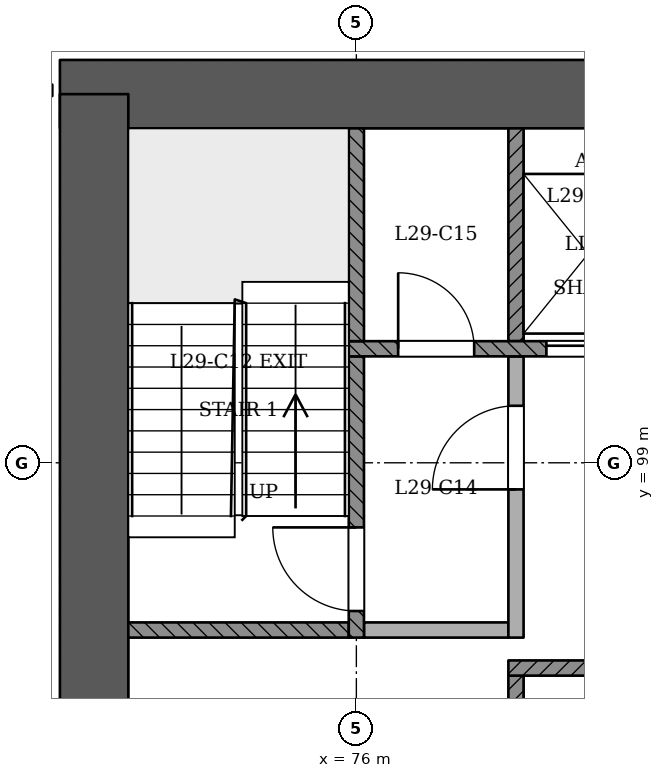
"""IFC4 building model, lengths in metres.
Left out: names, types, materials, properties, quantities, classifications, styles, units other than length and angle.
Written with IfcOpenShell. Run it as: python <this file> out.ifc"""

import sys

from ifc_helpers import new_model, si_unit, direction, frame, frame_2d, origin, place, context, subcontext, project, spatial, rectangle, extrude, element, fill, save


model = new_model("IFC4")
c1 = context("Model", 3, precision=1e-05, world=origin(), true_north=direction((0.0, 1.0)))
c2 = subcontext(c1, "Body", "Model", "MODEL_VIEW")
j1 = project(units=[si_unit("LENGTHUNIT", "METRE"), si_unit("PLANEANGLEUNIT", "RADIAN")], contexts=[c1])
p1 = place(None, origin())
s1 = spatial("IfcSite", under=j1, at=p1, CompositionType="ELEMENT")
p2 = place(p1, origin())
s2 = spatial("IfcBuilding", under=s1, at=p2, CompositionType="ELEMENT")
p3 = place(p2, frame((0.0, 0.0, 115.2)))
s3 = spatial("IfcBuildingStorey", under=s2, at=p3, CompositionType="ELEMENT", Elevation=115.2)
p4 = place(p3, frame((97.45, 103.85, 0.0), z_axis=(0.0, 0.0, 1.0), x_axis=(-1.0, 0.0, 0.0)))
e1 = element("IfcWall", 1, at=p4, inside=s3, PredefinedType="SHEAR", context=c2, shape_type="SweptSolid", body=[
    extrude(rectangle(XDim=25.35, YDim=0.9, at=frame_2d((12.675, 0.0))), origin(), (0.0, 0.0, 1.0), 3.6),
])
p5 = place(p3, frame((72.55, 103.85, 0.0), z_axis=(0.0, 0.0, 1.0), x_axis=(0.0, -1.0, 0.0)))
e2 = element("IfcWall", 2, at=p5, inside=s3, PredefinedType="SHEAR", context=c2, shape_type="SweptSolid", body=[
    extrude(rectangle(XDim=11.35, YDim=0.9, at=frame_2d((5.675, 0.0))), origin(), (0.0, 0.0, 1.0), 3.6),
])
p6 = place(p3, frame((64.109, 97.973, 0.0), z_axis=(0.0, 0.0, 1.0), x_axis=(0.499997402089, -0.866026903684, 0.0)))
e3 = element("IfcWall", 3, at=p6, inside=s3, PredefinedType="PARTITIONING", context=c2, shape_type="SweptSolid", body=[
    extrude(rectangle(XDim=41.173, YDim=0.15, at=frame_2d((20.586, 0.0))), origin(), (0.0, 0.0, 1.0), 2.75),
])
p7 = place(p6, frame((0.273, 0.0, 0.0)))
e4 = element("IfcOpeningElement", 4, at=p7, cuts=e3, PredefinedType="OPENING", context=c2, shape_type="SweptSolid", body=[
    extrude(rectangle(XDim=1.2, YDim=2.1, at=frame_2d((0.6, 1.05))), frame((0.0, 0.085, 0.0), z_axis=(0.0, -1.0, 0.0), x_axis=(1.0, 0.0, 0.0)), (0.0, 0.0, 1.0), 0.171),
])
p8 = place(p6, frame((10.987, 0.0, 0.0)))
e5 = element("IfcOpeningElement", 5, at=p8, cuts=e3, PredefinedType="OPENING", context=c2, shape_type="SweptSolid", body=[
    extrude(rectangle(XDim=1.2, YDim=2.1, at=frame_2d((0.6, 1.05))), frame((0.0, 0.085, 0.0), z_axis=(0.0, -1.0, 0.0), x_axis=(1.0, 0.0, 0.0)), (0.0, 0.0, 1.0), 0.171),
])
p9 = place(p6, frame((22.237, 0.0, 0.0)))
e6 = element("IfcOpeningElement", 6, at=p9, cuts=e3, PredefinedType="OPENING", context=c2, shape_type="SweptSolid", body=[
    extrude(rectangle(XDim=1.2, YDim=2.1, at=frame_2d((0.6, 1.05))), frame((0.0, 0.085, 0.0), z_axis=(0.0, -1.0, 0.0), x_axis=(1.0, 0.0, 0.0)), (0.0, 0.0, 1.0), 0.171),
])
p10 = place(p6, frame((32.387, 0.0, 0.0)))
e7 = element("IfcOpeningElement", 7, at=p10, cuts=e3, PredefinedType="OPENING", context=c2, shape_type="SweptSolid", body=[
    extrude(rectangle(XDim=1.2, YDim=2.1, at=frame_2d((0.6, 1.05))), frame((0.0, 0.085, 0.0), z_axis=(0.0, -1.0, 0.0), x_axis=(1.0, 0.0, 0.0)), (0.0, 0.0, 1.0), 0.171),
])
p11 = place(p6, frame((39.95, 0.0, 0.0)))
e8 = element("IfcOpeningElement", 8, at=p11, cuts=e3, PredefinedType="OPENING", context=c2, shape_type="SweptSolid", body=[
    extrude(rectangle(XDim=1.0, YDim=2.1, at=frame_2d((0.5, 1.05))), frame((0.0, 0.085, 0.0), z_axis=(0.0, -1.0, 0.0), x_axis=(1.0, 0.0, 0.0)), (0.0, 0.0, 1.0), 0.171),
])
p12 = place(p3, frame((78.1, 93.4, 0.0), z_axis=(0.0, 0.0, 1.0), x_axis=(0.0, 1.0, 0.0)))
e9 = element("IfcWall", 9, at=p12, inside=s3, PredefinedType="SOLIDWALL", context=c2, shape_type="SweptSolid", body=[
    extrude(rectangle(XDim=2.8, YDim=0.2, at=frame_2d((1.4, 0.0))), origin(), (0.0, 0.0, 1.0), 3.15),
])
p13 = place(p3, frame((78.0, 96.3, 0.0), z_axis=(0.0, 0.0, 1.0), x_axis=(1.0, 0.0, 0.0)))
e10 = element("IfcWall", 10, at=p13, inside=s3, PredefinedType="SOLIDWALL", context=c2, shape_type="SweptSolid", body=[
    extrude(rectangle(XDim=7.8, YDim=0.2, at=frame_2d((3.9, 0.0))), origin(), (0.0, 0.0, 1.0), 3.15),
])
p14 = place(p3, frame((73.0, 96.8, 0.0), z_axis=(0.0, 0.0, 1.0), x_axis=(1.0, 0.0, 0.0)))
e11 = element("IfcWall", 11, at=p14, inside=s3, PredefinedType="SOLIDWALL", context=c2, shape_type="SweptSolid", body=[
    extrude(rectangle(XDim=2.9, YDim=0.2, at=frame_2d((1.45, 0.0))), origin(), (0.0, 0.0, 1.0), 3.15),
])
p15 = place(p3, frame((76.0, 96.7, 0.0), z_axis=(0.0, 0.0, 1.0), x_axis=(0.0, 1.0, 0.0)))
e12 = element("IfcWall", 12, at=p15, inside=s3, PredefinedType="SOLIDWALL", context=c2, shape_type="SweptSolid", body=[
    extrude(rectangle(XDim=3.7, YDim=0.2, at=frame_2d((1.85, 0.0))), origin(), (0.0, 0.0, 1.0), 3.15),
])
p16 = place(p15, frame((0.35, 0.0, 0.0)))
e13 = element("IfcOpeningElement", 13, at=p16, cuts=e12, PredefinedType="OPENING", context=c2, shape_type="SweptSolid", body=[
    extrude(rectangle(XDim=1.1, YDim=2.1, at=frame_2d((0.55, 1.05))), frame((0.0, 0.11, 0.0), z_axis=(0.0, -1.0, 0.0), x_axis=(1.0, 0.0, 0.0)), (0.0, 0.0, 1.0), 0.221),
])
p17 = place(p3, frame((76.1, 96.8, 0.0), z_axis=(0.0, 0.0, 1.0), x_axis=(1.0, 0.0, 0.0)))
e14 = element("IfcWall", 14, at=p17, inside=s3, PredefinedType="PARTITIONING", context=c2, shape_type="SweptSolid", body=[
    extrude(rectangle(XDim=1.9, YDim=0.2, at=frame_2d((0.95, 0.0))), origin(), (0.0, 0.0, 1.0), 3.15),
])
p18 = place(p3, frame((78.1, 96.7, 0.0), z_axis=(0.0, 0.0, 1.0), x_axis=(0.0, 1.0, 0.0)))
e15 = element("IfcWall", 15, at=p18, inside=s3, PredefinedType="PARTITIONING", context=c2, shape_type="SweptSolid", body=[
    extrude(rectangle(XDim=3.7, YDim=0.2, at=frame_2d((1.85, 0.0))), origin(), (0.0, 0.0, 1.0), 3.15),
])
p19 = place(p18, frame((1.95, 0.0, 0.0)))
e16 = element("IfcOpeningElement", 16, at=p19, cuts=e15, PredefinedType="OPENING", context=c2, shape_type="SweptSolid", body=[
    extrude(rectangle(XDim=1.1, YDim=2.1, at=frame_2d((0.55, 1.05))), frame((0.0, 0.11, 0.0), z_axis=(0.0, -1.0, 0.0), x_axis=(1.0, 0.0, 0.0)), (0.0, 0.0, 1.0), 0.221),
])
p20 = place(p3, frame((75.9, 100.5, 0.0), z_axis=(0.0, 0.0, 1.0), x_axis=(1.0, 0.0, 0.0)))
e17 = element("IfcWall", 17, at=p20, inside=s3, PredefinedType="SOLIDWALL", context=c2, shape_type="SweptSolid", body=[
    extrude(rectangle(XDim=18.2, YDim=0.2, at=frame_2d((9.1, 0.0))), origin(), (0.0, 0.0, 1.0), 3.15),
])
p21 = place(p20, frame((2.6, 0.0, 0.0)))
e18 = element("IfcOpeningElement", 18, at=p21, cuts=e17, PredefinedType="OPENING", context=c2, shape_type="SweptSolid", body=[
    extrude(rectangle(XDim=1.1, YDim=2.1, at=frame_2d((0.55, 1.05))), frame((0.0, 0.11, 0.0), z_axis=(0.0, -1.0, 0.0), x_axis=(1.0, 0.0, 0.0)), (0.0, 0.0, 1.0), 0.221),
])
p22 = place(p20, frame((4.5, 0.0, 0.0)))
e19 = element("IfcOpeningElement", 19, at=p22, cuts=e17, PredefinedType="OPENING", context=c2, shape_type="SweptSolid", body=[
    extrude(rectangle(XDim=1.1, YDim=2.1, at=frame_2d((0.55, 1.05))), frame((0.0, 0.11, 0.0), z_axis=(0.0, -1.0, 0.0), x_axis=(1.0, 0.0, 0.0)), (0.0, 0.0, 1.0), 0.221),
])
p23 = place(p20, frame((6.4, 0.0, 0.0)))
e20 = element("IfcOpeningElement", 20, at=p23, cuts=e17, PredefinedType="OPENING", context=c2, shape_type="SweptSolid", body=[
    extrude(rectangle(XDim=1.1, YDim=2.1, at=frame_2d((0.55, 1.05))), frame((0.0, 0.11, 0.0), z_axis=(0.0, -1.0, 0.0), x_axis=(1.0, 0.0, 0.0)), (0.0, 0.0, 1.0), 0.221),
])
p24 = place(p20, frame((8.3, 0.0, 0.0)))
e21 = element("IfcOpeningElement", 21, at=p24, cuts=e17, PredefinedType="OPENING", context=c2, shape_type="SweptSolid", body=[
    extrude(rectangle(XDim=1.1, YDim=2.1, at=frame_2d((0.55, 1.05))), frame((0.0, 0.11, 0.0), z_axis=(0.0, -1.0, 0.0), x_axis=(1.0, 0.0, 0.0)), (0.0, 0.0, 1.0), 0.221),
])
p25 = place(p20, frame((10.2, 0.0, 0.0)))
e22 = element("IfcOpeningElement", 22, at=p25, cuts=e17, PredefinedType="OPENING", context=c2, shape_type="SweptSolid", body=[
    extrude(rectangle(XDim=1.1, YDim=2.1, at=frame_2d((0.55, 1.05))), frame((0.0, 0.11, 0.0), z_axis=(0.0, -1.0, 0.0), x_axis=(1.0, 0.0, 0.0)), (0.0, 0.0, 1.0), 0.221),
])
p26 = place(p20, frame((12.1, 0.0, 0.0)))
e23 = element("IfcOpeningElement", 23, at=p26, cuts=e17, PredefinedType="OPENING", context=c2, shape_type="SweptSolid", body=[
    extrude(rectangle(XDim=1.1, YDim=2.1, at=frame_2d((0.55, 1.05))), frame((0.0, 0.11, 0.0), z_axis=(0.0, -1.0, 0.0), x_axis=(1.0, 0.0, 0.0)), (0.0, 0.0, 1.0), 0.221),
])
p27 = place(p20, frame((14.0, 0.0, 0.0)))
e24 = element("IfcOpeningElement", 24, at=p27, cuts=e17, PredefinedType="OPENING", context=c2, shape_type="SweptSolid", body=[
    extrude(rectangle(XDim=1.1, YDim=2.1, at=frame_2d((0.55, 1.05))), frame((0.0, 0.11, 0.0), z_axis=(0.0, -1.0, 0.0), x_axis=(1.0, 0.0, 0.0)), (0.0, 0.0, 1.0), 0.221),
])
p28 = place(p20, frame((0.65, 0.0, 0.0)))
e25 = element("IfcOpeningElement", 25, at=p28, cuts=e17, PredefinedType="OPENING", context=c2, shape_type="SweptSolid", body=[
    extrude(rectangle(XDim=1.0, YDim=2.1, at=frame_2d((0.5, 1.05))), frame((0.0, 0.11, 0.0), z_axis=(0.0, -1.0, 0.0), x_axis=(1.0, 0.0, 0.0)), (0.0, 0.0, 1.0), 0.221),
])
p29 = place(p20, frame((16.3, 0.0, 0.0)))
e26 = element("IfcOpeningElement", 26, at=p29, cuts=e17, PredefinedType="OPENING", context=c2, shape_type="SweptSolid", body=[
    extrude(rectangle(XDim=1.0, YDim=2.1, at=frame_2d((0.5, 1.05))), frame((0.0, 0.11, 0.0), z_axis=(0.0, -1.0, 0.0), x_axis=(1.0, 0.0, 0.0)), (0.0, 0.0, 1.0), 0.221),
])
for number, where, z_axis, x_axis in (
    (27, (76.0, 100.6, 0.0), (0.0, 0.0, 1.0), (0.0, 1.0, 0.0)),
    (28, (78.1, 100.6, 0.0), (0.0, 0.0, 1.0), (0.0, 1.0, 0.0)),
):
    element("IfcWall", number, at=place(p3, frame(where, z_axis=z_axis, x_axis=x_axis)), inside=s3, PredefinedType="SOLIDWALL", context=c2, shape_type="SweptSolid", body=[
        extrude(rectangle(XDim=2.8, YDim=0.2, at=frame_2d((1.4, 0.0))), origin(), (0.0, 0.0, 1.0), 3.15),
    ])
p30 = place(p21, origin())
e29 = element("IfcDoor", 29, at=p30, inside=s3, OperationType="SLIDING_TO_RIGHT", PredefinedType="NOTDEFINED", context=c2, shape_type="SweptSolid", body=[
    extrude(rectangle(XDim=1.1, YDim=2.1, at=frame_2d((0.55, 1.05))), frame((0.0, 0.025, 0.0), z_axis=(0.0, -1.0, 0.0), x_axis=(1.0, 0.0, 0.0)), (0.0, 0.0, 1.0), 0.05),
])
fill(e18, e29)
p31 = place(p16, origin())
e30 = element("IfcDoor", 30, at=p31, inside=s3, OperationType="SINGLE_SWING_RIGHT", PredefinedType="NOTDEFINED", context=c2, shape_type="SweptSolid", body=[
    extrude(rectangle(XDim=1.1, YDim=2.1, at=frame_2d((0.55, 1.05))), frame((0.0, 0.025, 0.0), z_axis=(0.0, -1.0, 0.0), x_axis=(1.0, 0.0, 0.0)), (0.0, 0.0, 1.0), 0.05),
])
fill(e13, e30)
p32 = place(p19, origin())
e31 = element("IfcDoor", 31, at=p32, inside=s3, OperationType="SINGLE_SWING_LEFT", PredefinedType="NOTDEFINED", context=c2, shape_type="SweptSolid", body=[
    extrude(rectangle(XDim=1.1, YDim=2.1, at=frame_2d((0.55, 1.05))), frame((0.0, 0.025, 0.0), z_axis=(0.0, -1.0, 0.0), x_axis=(1.0, 0.0, 0.0)), (0.0, 0.0, 1.0), 0.05),
])
fill(e16, e31)
p33 = place(p28, origin())
e32 = element("IfcDoor", 32, at=p33, inside=s3, OperationType="SINGLE_SWING_LEFT", PredefinedType="NOTDEFINED", context=c2, shape_type="SweptSolid", body=[
    extrude(rectangle(XDim=1.0, YDim=2.1, at=frame_2d((0.5, 1.05))), frame((0.0, 0.025, 0.0), z_axis=(0.0, -1.0, 0.0), x_axis=(1.0, 0.0, 0.0)), (0.0, 0.0, 1.0), 0.05),
])
fill(e25, e32)
save(model, sys.argv[1])
